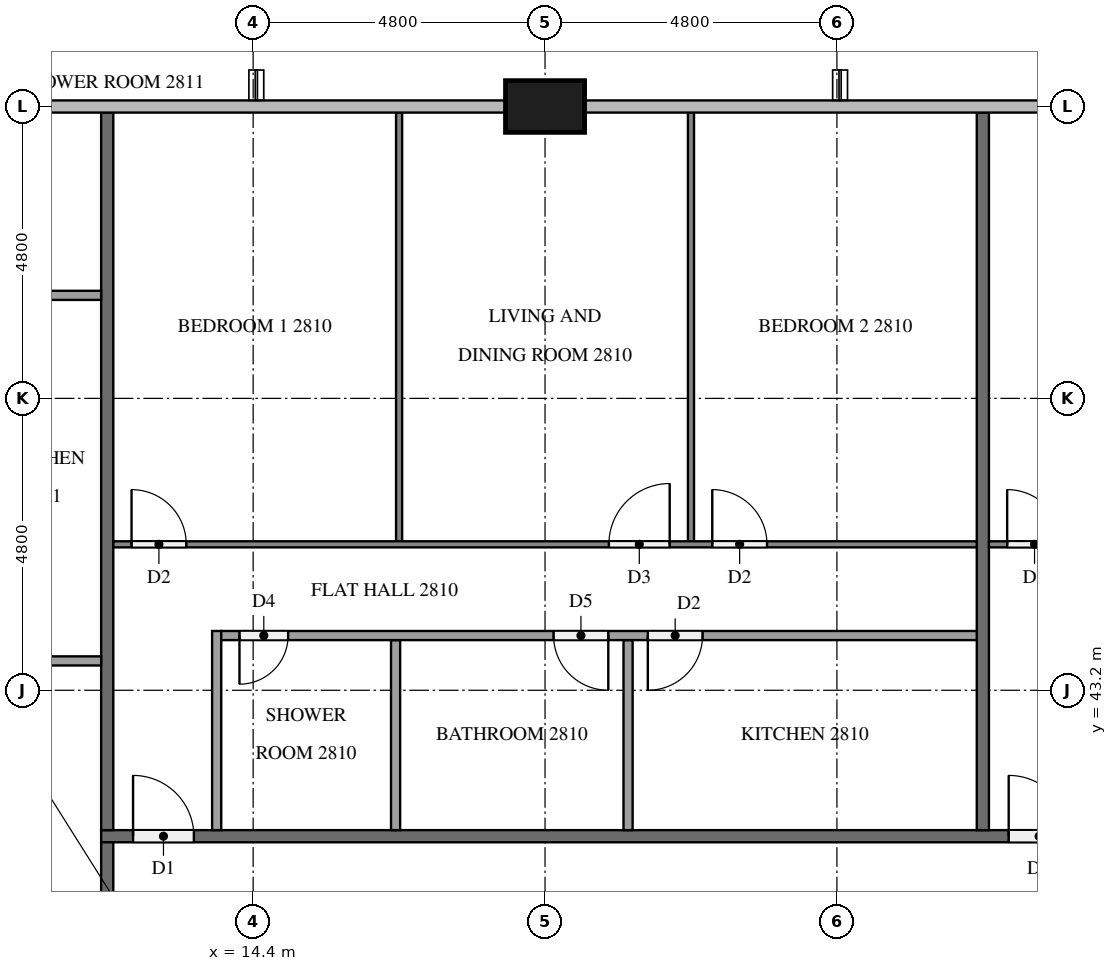
"""IFC4 building model, lengths in metres.
Left out: names, types, materials, properties, quantities, classifications, styles, units other than length and angle.
Written with IfcOpenShell. Run it as: python <this file> out.ifc"""

import sys

from ifc_helpers import new_model, si_unit, direction, frame, frame_2d, origin, origin_2d, place, context, subcontext, project, spatial, rectangle, extrude, element, fill, save


model = new_model("IFC4")
c1 = context("Model", 3, precision=1e-05, world=origin(), true_north=direction((0.0, 1.0)))
c2 = subcontext(c1, "Body", "Model", "MODEL_VIEW")
j1 = project(units=[si_unit("LENGTHUNIT", "METRE"), si_unit("PLANEANGLEUNIT", "RADIAN")], contexts=[c1])
p1 = place(None, origin())
s1 = spatial("IfcSite", under=j1, at=p1, CompositionType="ELEMENT")
p2 = place(p1, origin())
s2 = spatial("IfcBuilding", under=s1, at=p2, CompositionType="ELEMENT")
p3 = place(p2, frame((0.0, 0.0, 110.2)))
s3 = spatial("IfcBuildingStorey", under=s2, at=p3, CompositionType="ELEMENT", Elevation=110.2)
p4 = place(p3, frame((19.2, 52.8, 0.0), z_axis=(0.0, 0.0, 1.0), x_axis=(1.0, 0.0, 0.0)))
e1 = element("IfcColumn", 1, at=p4, inside=s3, PredefinedType="COLUMN", context=c2, shape_type="SweptSolid", body=[
    extrude(rectangle(XDim=1.3, YDim=0.85, at=origin_2d()), origin(), (0.0, 0.0, 1.0), 3.1),
])
p5 = place(p3, frame((11.9, 40.8, 0.0), z_axis=(0.0, 0.0, 1.0), x_axis=(1.0, 0.0, 0.0)))
e2 = element("IfcWall", 2, at=p5, inside=s3, PredefinedType="PARTITIONING", context=c2, shape_type="SweptSolid", body=[
    extrude(rectangle(XDim=38.6, YDim=0.2, at=frame_2d((19.3, 0.0))), origin(), (0.0, 0.0, 1.0), 3.1),
])
p6 = place(p5, frame((37.075, 0.0, 0.0)))
e3 = element("IfcOpeningElement", 3, at=p6, cuts=e2, PredefinedType="OPENING", context=c2, shape_type="SweptSolid", body=[
    extrude(rectangle(XDim=1.0, YDim=2.1, at=frame_2d((0.5, 1.05))), frame((0.0, 0.11, 0.0), z_axis=(0.0, -1.0, 0.0), x_axis=(1.0, 0.0, 0.0)), (0.0, 0.0, 1.0), 0.22),
])
p7 = place(p5, frame((14.925, 0.0, 0.0)))
e4 = element("IfcOpeningElement", 4, at=p7, cuts=e2, PredefinedType="OPENING", context=c2, shape_type="SweptSolid", body=[
    extrude(rectangle(XDim=1.0, YDim=2.1, at=frame_2d((0.5, 1.05))), frame((0.0, 0.11, 0.0), z_axis=(0.0, -1.0, 0.0), x_axis=(1.0, 0.0, 0.0)), (0.0, 0.0, 1.0), 0.22),
])
p8 = place(p5, frame((0.525, 0.0, 0.0)))
e5 = element("IfcOpeningElement", 5, at=p8, cuts=e2, PredefinedType="OPENING", context=c2, shape_type="SweptSolid", body=[
    extrude(rectangle(XDim=1.0, YDim=2.1, at=frame_2d((0.5, 1.05))), frame((0.0, 0.11, 0.0), z_axis=(0.0, -1.0, 0.0), x_axis=(1.0, 0.0, 0.0)), (0.0, 0.0, 1.0), 0.22),
])
p9 = place(p3, frame((12.0, 37.9, 0.0), z_axis=(0.0, 0.0, 1.0), x_axis=(0.0, 1.0, 0.0)))
e6 = element("IfcWall", 6, at=p9, inside=s3, PredefinedType="PARTITIONING", context=c2, shape_type="SweptSolid", body=[
    extrude(rectangle(XDim=2.8, YDim=0.2, at=frame_2d((1.4, 0.0))), origin(), (0.0, 0.0, 1.0), 3.1),
])
p10 = place(p9, frame((0.325, 0.0, 0.0)))
e7 = element("IfcOpeningElement", 7, at=p10, cuts=e6, PredefinedType="OPENING", context=c2, shape_type="SweptSolid", body=[
    extrude(rectangle(XDim=1.0, YDim=2.1, at=frame_2d((0.5, 1.05))), frame((0.0, 0.11, 0.0), z_axis=(0.0, -1.0, 0.0), x_axis=(1.0, 0.0, 0.0)), (0.0, 0.0, 1.0), 0.22),
])
for number, where, z_axis, x_axis in (
    (8, (26.4, 52.7, 0.0), (0.0, 0.0, 1.0), (0.0, -1.0, 0.0)),
    (9, (12.0, 52.7, 0.0), (0.0, 0.0, 1.0), (0.0, -1.0, 0.0)),
):
    element("IfcWall", number, at=place(p3, frame(where, z_axis=z_axis, x_axis=x_axis)), inside=s3, PredefinedType="PARTITIONING", context=c2, shape_type="SweptSolid", body=[
        extrude(rectangle(XDim=11.8, YDim=0.2, at=frame_2d((5.9, 0.0))), origin(), (0.0, 0.0, 1.0), 3.1),
    ])
p11 = place(p3, frame((26.5, 45.6, 0.0), z_axis=(0.0, 0.0, 1.0), x_axis=(1.0, 0.0, 0.0)))
e10 = element("IfcWall", 10, at=p11, inside=s3, PredefinedType="PARTITIONING", context=c2, shape_type="SweptSolid", body=[
    extrude(rectangle(XDim=11.8, YDim=0.1, at=frame_2d((5.9, 0.0))), origin(), (0.0, 0.0, 1.0), 3.1),
])
p12 = place(p11, frame((0.3, 0.0, 0.0)))
e11 = element("IfcOpeningElement", 11, at=p12, cuts=e10, PredefinedType="OPENING", context=c2, shape_type="SweptSolid", body=[
    extrude(rectangle(XDim=0.9, YDim=2.1, at=frame_2d((0.45, 1.05))), frame((0.0, 0.06, 0.0), z_axis=(0.0, -1.0, 0.0), x_axis=(1.0, 0.0, 0.0)), (0.0, 0.0, 1.0), 0.12),
])
p13 = place(p11, frame((10.5, 0.0, 0.0)))
e12 = element("IfcOpeningElement", 12, at=p13, cuts=e10, PredefinedType="OPENING", context=c2, shape_type="SweptSolid", body=[
    extrude(rectangle(XDim=1.0, YDim=2.1, at=frame_2d((0.5, 1.05))), frame((0.0, 0.06, 0.0), z_axis=(0.0, -1.0, 0.0), x_axis=(1.0, 0.0, 0.0)), (0.0, 0.0, 1.0), 0.12),
])
for number, where, z_axis, x_axis in (
    (13, (16.8, 45.65, 0.0), (0.0, 0.0, 1.0), (0.0, 1.0, 0.0)),
    (14, (21.6, 45.65, 0.0), (0.0, 0.0, 1.0), (0.0, 1.0, 0.0)),
):
    element("IfcWall", number, at=place(p3, frame(where, z_axis=z_axis, x_axis=x_axis)), inside=s3, PredefinedType="PARTITIONING", context=c2, shape_type="SweptSolid", body=[
        extrude(rectangle(XDim=7.05, YDim=0.1, at=frame_2d((3.525, 0.0))), origin(), (0.0, 0.0, 1.0), 3.1),
    ])
p14 = place(p3, frame((12.1, 45.6, 0.0), z_axis=(0.0, 0.0, 1.0), x_axis=(1.0, 0.0, 0.0)))
e15 = element("IfcWall", 15, at=p14, inside=s3, PredefinedType="PARTITIONING", context=c2, shape_type="SweptSolid", body=[
    extrude(rectangle(XDim=14.2, YDim=0.1, at=frame_2d((7.1, 0.0))), origin(), (0.0, 0.0, 1.0), 3.1),
])
p15 = place(p14, frame((0.3, 0.0, 0.0)))
e16 = element("IfcOpeningElement", 16, at=p15, cuts=e15, PredefinedType="OPENING", context=c2, shape_type="SweptSolid", body=[
    extrude(rectangle(XDim=0.9, YDim=2.1, at=frame_2d((0.45, 1.05))), frame((0.0, 0.06, 0.0), z_axis=(0.0, -1.0, 0.0), x_axis=(1.0, 0.0, 0.0)), (0.0, 0.0, 1.0), 0.12),
])
p16 = place(p14, frame((8.15, 0.0, 0.0)))
e17 = element("IfcOpeningElement", 17, at=p16, cuts=e15, PredefinedType="OPENING", context=c2, shape_type="SweptSolid", body=[
    extrude(rectangle(XDim=1.0, YDim=2.1, at=frame_2d((0.5, 1.05))), frame((0.0, 0.06, 0.0), z_axis=(0.0, -1.0, 0.0), x_axis=(1.0, 0.0, 0.0)), (0.0, 0.0, 1.0), 0.12),
])
p17 = place(p14, frame((9.85, 0.0, 0.0)))
e18 = element("IfcOpeningElement", 18, at=p17, cuts=e15, PredefinedType="OPENING", context=c2, shape_type="SweptSolid", body=[
    extrude(rectangle(XDim=0.9, YDim=2.1, at=frame_2d((0.45, 1.05))), frame((0.0, 0.06, 0.0), z_axis=(0.0, -1.0, 0.0), x_axis=(1.0, 0.0, 0.0)), (0.0, 0.0, 1.0), 0.12),
])
for number, where, z_axis, x_axis in (
    (19, (16.742, 40.9, 0.0), (0.0, 0.0, 1.0), (0.0, 1.0, 0.0)),
    (20, (20.565, 40.9, 0.0), (0.0, 0.0, 1.0), (0.0, 1.0, 0.0)),
):
    element("IfcWall", number, at=place(p3, frame(where, z_axis=z_axis, x_axis=x_axis)), inside=s3, PredefinedType="PARTITIONING", context=c2, shape_type="SweptSolid", body=[
        extrude(rectangle(XDim=3.125, YDim=0.15, at=frame_2d((1.562, 0.0))), origin(), (0.0, 0.0, 1.0), 3.1),
    ])
p18 = place(p3, frame((13.8, 40.9, 0.0), z_axis=(0.0, 0.0, 1.0), x_axis=(0.0, 1.0, 0.0)))
e21 = element("IfcWall", 21, at=p18, inside=s3, PredefinedType="PARTITIONING", context=c2, shape_type="SweptSolid", body=[
    extrude(rectangle(XDim=3.275, YDim=0.15, at=frame_2d((1.638, 0.0))), origin(), (0.0, 0.0, 1.0), 3.1),
])
p19 = place(p3, frame((26.3, 44.1, 0.0), z_axis=(0.0, 0.0, 1.0), x_axis=(-1.0, 0.0, 0.0)))
e22 = element("IfcWall", 22, at=p19, inside=s3, PredefinedType="PARTITIONING", context=c2, shape_type="SweptSolid", body=[
    extrude(rectangle(XDim=12.425, YDim=0.15, at=frame_2d((6.212, 0.0))), origin(), (0.0, 0.0, 1.0), 3.1),
])
p20 = place(p19, frame((11.325, 0.0, 0.0)))
e23 = element("IfcOpeningElement", 23, at=p20, cuts=e22, PredefinedType="OPENING", context=c2, shape_type="SweptSolid", body=[
    extrude(rectangle(XDim=0.8, YDim=2.1, at=frame_2d((0.4, 1.05))), frame((0.0, 0.085, 0.0), z_axis=(0.0, -1.0, 0.0), x_axis=(1.0, 0.0, 0.0)), (0.0, 0.0, 1.0), 0.17),
])
p21 = place(p19, frame((6.06, 0.0, 0.0)))
e24 = element("IfcOpeningElement", 24, at=p21, cuts=e22, PredefinedType="OPENING", context=c2, shape_type="SweptSolid", body=[
    extrude(rectangle(XDim=0.9, YDim=2.1, at=frame_2d((0.45, 1.05))), frame((0.0, 0.085, 0.0), z_axis=(0.0, -1.0, 0.0), x_axis=(1.0, 0.0, 0.0)), (0.0, 0.0, 1.0), 0.17),
])
p22 = place(p19, frame((4.51, 0.0, 0.0)))
e25 = element("IfcOpeningElement", 25, at=p22, cuts=e22, PredefinedType="OPENING", context=c2, shape_type="SweptSolid", body=[
    extrude(rectangle(XDim=0.9, YDim=2.1, at=frame_2d((0.45, 1.05))), frame((0.0, 0.085, 0.0), z_axis=(0.0, -1.0, 0.0), x_axis=(1.0, 0.0, 0.0)), (0.0, 0.0, 1.0), 0.17),
])
for number, where, z_axis, x_axis in (
    (26, (11.9, 43.683, 0.0), (0.0, 0.0, 1.0), (-1.0, 0.0, 0.0)),
    (27, (11.9, 49.694, 0.0), (0.0, 0.0, 1.0), (-1.0, 0.0, 0.0)),
):
    element("IfcWall", number, at=place(p3, frame(where, z_axis=z_axis, x_axis=x_axis)), inside=s3, PredefinedType="PARTITIONING", context=c2, shape_type="SweptSolid", body=[
        extrude(rectangle(XDim=1.925, YDim=0.15, at=frame_2d((0.962, 0.0))), origin(), (0.0, 0.0, 1.0), 3.1),
    ])
p23 = place(p7, origin())
e28 = element("IfcDoor", 28, at=p23, inside=s3, OperationType="SINGLE_SWING_LEFT", PredefinedType="DOOR", context=c2, shape_type="SweptSolid", body=[
    extrude(rectangle(XDim=1.0, YDim=2.1, at=frame_2d((0.5, 1.05))), frame((0.0, 0.025, 0.0), z_axis=(0.0, -1.0, 0.0), x_axis=(1.0, 0.0, 0.0)), (0.0, 0.0, 1.0), 0.05),
])
fill(e4, e28)
p24 = place(p8, origin())
e29 = element("IfcDoor", 29, at=p24, inside=s3, OperationType="SINGLE_SWING_LEFT", PredefinedType="DOOR", context=c2, shape_type="SweptSolid", body=[
    extrude(rectangle(XDim=1.0, YDim=2.1, at=frame_2d((0.5, 1.05))), frame((0.0, 0.025, 0.0), z_axis=(0.0, -1.0, 0.0), x_axis=(1.0, 0.0, 0.0)), (0.0, 0.0, 1.0), 0.05),
])
fill(e5, e29)
p25 = place(p12, origin())
e30 = element("IfcDoor", 30, at=p25, inside=s3, OperationType="SINGLE_SWING_LEFT", PredefinedType="DOOR", context=c2, shape_type="SweptSolid", body=[
    extrude(rectangle(XDim=0.9, YDim=2.1, at=frame_2d((0.45, 1.05))), frame((0.0, 0.025, 0.0), z_axis=(0.0, -1.0, 0.0), x_axis=(1.0, 0.0, 0.0)), (0.0, 0.0, 1.0), 0.05),
])
fill(e11, e30)
p26 = place(p15, origin())
e31 = element("IfcDoor", 31, at=p26, inside=s3, OperationType="SINGLE_SWING_LEFT", PredefinedType="DOOR", context=c2, shape_type="SweptSolid", body=[
    extrude(rectangle(XDim=0.9, YDim=2.1, at=frame_2d((0.45, 1.05))), frame((0.0, 0.025, 0.0), z_axis=(0.0, -1.0, 0.0), x_axis=(1.0, 0.0, 0.0)), (0.0, 0.0, 1.0), 0.05),
])
fill(e16, e31)
p27 = place(p16, origin())
e32 = element("IfcDoor", 32, at=p27, inside=s3, OperationType="SINGLE_SWING_RIGHT", PredefinedType="DOOR", context=c2, shape_type="SweptSolid", body=[
    extrude(rectangle(XDim=1.0, YDim=2.1, at=frame_2d((0.5, 1.05))), frame((0.0, 0.025, 0.0), z_axis=(0.0, -1.0, 0.0), x_axis=(1.0, 0.0, 0.0)), (0.0, 0.0, 1.0), 0.05),
])
fill(e17, e32)
p28 = place(p17, origin())
e33 = element("IfcDoor", 33, at=p28, inside=s3, OperationType="SINGLE_SWING_LEFT", PredefinedType="DOOR", context=c2, shape_type="SweptSolid", body=[
    extrude(rectangle(XDim=0.9, YDim=2.1, at=frame_2d((0.45, 1.05))), frame((0.0, 0.025, 0.0), z_axis=(0.0, -1.0, 0.0), x_axis=(1.0, 0.0, 0.0)), (0.0, 0.0, 1.0), 0.05),
])
fill(e18, e33)
p29 = place(p20, origin())
e34 = element("IfcDoor", 34, at=p29, inside=s3, OperationType="SINGLE_SWING_RIGHT", PredefinedType="DOOR", context=c2, shape_type="SweptSolid", body=[
    extrude(rectangle(XDim=0.8, YDim=2.1, at=frame_2d((0.4, 1.05))), frame((0.0, 0.025, 0.0), z_axis=(0.0, -1.0, 0.0), x_axis=(1.0, 0.0, 0.0)), (0.0, 0.0, 1.0), 0.05),
])
fill(e23, e34)
p30 = place(p21, origin())
e35 = element("IfcDoor", 35, at=p30, inside=s3, OperationType="SINGLE_SWING_LEFT", PredefinedType="DOOR", context=c2, shape_type="SweptSolid", body=[
    extrude(rectangle(XDim=0.9, YDim=2.1, at=frame_2d((0.45, 1.05))), frame((0.0, 0.025, 0.0), z_axis=(0.0, -1.0, 0.0), x_axis=(1.0, 0.0, 0.0)), (0.0, 0.0, 1.0), 0.05),
])
fill(e24, e35)
p31 = place(p22, origin())
e36 = element("IfcDoor", 36, at=p31, inside=s3, OperationType="SINGLE_SWING_RIGHT", PredefinedType="DOOR", context=c2, shape_type="SweptSolid", body=[
    extrude(rectangle(XDim=0.9, YDim=2.1, at=frame_2d((0.45, 1.05))), frame((0.0, 0.025, 0.0), z_axis=(0.0, -1.0, 0.0), x_axis=(1.0, 0.0, 0.0)), (0.0, 0.0, 1.0), 0.05),
])
fill(e25, e36)
save(model, sys.argv[1])
